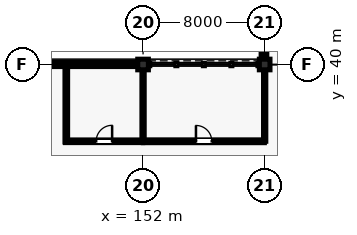
"""IFC4 building model, lengths in metres.
Left out: names, types, materials, properties, quantities, classifications, styles, units other than length and angle.
Written with IfcOpenShell. Run it as: python <this file> out.ifc"""

import sys

from ifc_helpers import new_model, si_unit, direction, frame, frame_2d, origin, origin_2d, place, context, subcontext, project, spatial, rectangle, extrude, element, fill, save


model = new_model("IFC4")
c1 = context("Model", 3, precision=1e-05, world=origin(), true_north=direction((0.0, 1.0)))
c2 = subcontext(c1, "Body", "Model", "MODEL_VIEW")
j1 = project(units=[si_unit("LENGTHUNIT", "METRE"), si_unit("PLANEANGLEUNIT", "RADIAN")], contexts=[c1])
p1 = place(None, origin())
s1 = spatial("IfcSite", under=j1, at=p1, CompositionType="ELEMENT")
p2 = place(p1, origin())
s2 = spatial("IfcBuilding", under=s1, at=p2, CompositionType="ELEMENT")
p3 = place(p2, origin())
s3 = spatial("IfcBuildingStorey", under=s2, at=p3, CompositionType="ELEMENT", Elevation=0.0)
for number, where, z_axis, x_axis in (
    (1, (152.0, 40.0, 0.0), (0.0, 0.0, 1.0), (1.0, 0.0, 0.0)),
    (2, (160.0, 40.0, 0.0), (0.0, 0.0, 1.0), (1.0, 0.0, 0.0)),
):
    element("IfcColumn", number, at=place(p3, frame(where, z_axis=z_axis, x_axis=x_axis)), inside=s3, PredefinedType="COLUMN", context=c2, shape_type="SweptSolid", body=[
        extrude(rectangle(XDim=0.7, YDim=0.7, at=origin_2d()), origin(), (0.0, 0.0, 1.0), 5.28),
    ])
p4 = place(p3, frame((144.335, 40.0, 0.0), z_axis=(0.0, 0.0, 1.0), x_axis=(1.0, 0.0, 0.0)))
e3 = element("IfcWall", 3, at=p4, inside=s3, PredefinedType="SOLIDWALL", context=c2, shape_type="SweptSolid", body=[
    extrude(rectangle(XDim=7.33, YDim=0.27, at=frame_2d((3.665, 0.0))), origin(), (0.0, 0.0, 1.0), 4.677),
])
p5 = place(p4, frame((0.744, 0.0, 0.95)))
e4 = element("IfcOpeningElement", 4, at=p5, cuts=e3, PredefinedType="OPENING", context=c2, shape_type="SweptSolid", body=[
    extrude(rectangle(XDim=1.15, YDim=1.65, at=frame_2d((0.575, 0.825))), frame((0.0, 0.145, 0.0), z_axis=(0.0, -1.0, 0.0), x_axis=(1.0, 0.0, 0.0)), (0.0, 0.0, 1.0), 0.29),
])
p6 = place(p4, frame((5.436, 0.0, 0.95)))
e5 = element("IfcOpeningElement", 5, at=p6, cuts=e3, PredefinedType="OPENING", context=c2, shape_type="SweptSolid", body=[
    extrude(rectangle(XDim=1.15, YDim=1.65, at=frame_2d((0.575, 0.825))), frame((0.0, 0.145, 0.0), z_axis=(0.0, -1.0, 0.0), x_axis=(1.0, 0.0, 0.0)), (0.0, 0.0, 1.0), 0.29),
])
p7 = place(p3, frame((160.0, 40.335, 0.0), z_axis=(0.0, 0.0, 1.0), x_axis=(0.0, 1.0, 0.0)))
e6 = element("IfcWall", 6, at=p7, inside=s3, PredefinedType="SOLIDWALL", context=c2, shape_type="SweptSolid", body=[
    extrude(rectangle(XDim=7.33, YDim=0.28, at=frame_2d((3.665, 0.0))), origin(), (0.0, 0.0, 1.0), 4.674),
])
p8 = place(p7, frame((0.679, 0.0, 0.95)))
e7 = element("IfcOpeningElement", 7, at=p8, cuts=e6, PredefinedType="OPENING", context=c2, shape_type="SweptSolid", body=[
    extrude(rectangle(XDim=1.28, YDim=1.72, at=frame_2d((0.64, 0.86))), frame((0.0, 0.15, 0.0), z_axis=(0.0, -1.0, 0.0), x_axis=(1.0, 0.0, 0.0)), (0.0, 0.0, 1.0), 0.3),
])
p9 = place(p7, frame((5.371, 0.0, 0.95)))
e8 = element("IfcOpeningElement", 8, at=p9, cuts=e6, PredefinedType="OPENING", context=c2, shape_type="SweptSolid", body=[
    extrude(rectangle(XDim=1.28, YDim=1.72, at=frame_2d((0.64, 0.86))), frame((0.0, 0.15, 0.0), z_axis=(0.0, -1.0, 0.0), x_axis=(1.0, 0.0, 0.0)), (0.0, 0.0, 1.0), 0.3),
])
p10 = place(p3, frame((146.9, 34.95, 0.0), z_axis=(0.0, 0.0, 1.0), x_axis=(1.0, 0.0, 0.0)))
e9 = element("IfcWall", 9, at=p10, inside=s3, PredefinedType="PARTITIONING", context=c2, shape_type="SweptSolid", body=[
    extrude(rectangle(XDim=5.08, YDim=0.175, at=frame_2d((2.54, 0.0))), origin(), (0.0, 0.0, 1.0), 4.471),
])
p11 = place(p10, frame((2.015, 0.0, 0.0)))
e10 = element("IfcOpeningElement", 10, at=p11, cuts=e9, PredefinedType="OPENING", context=c2, shape_type="SweptSolid", body=[
    extrude(rectangle(XDim=1.05, YDim=2.15, at=frame_2d((0.525, 1.075))), frame((0.0, 0.097, 0.0), z_axis=(0.0, -1.0, 0.0), x_axis=(1.0, 0.0, 0.0)), (0.0, 0.0, 1.0), 0.195),
])
p12 = place(p3, frame((146.95, 34.9, 0.0), z_axis=(0.0, 0.0, 1.0), x_axis=(0.0, 1.0, 0.0)))
e11 = element("IfcWall", 11, at=p12, inside=s3, PredefinedType="PARTITIONING", context=c2, shape_type="SweptSolid", body=[
    extrude(rectangle(XDim=5.08, YDim=0.175, at=frame_2d((2.54, 0.0))), origin(), (0.0, 0.0, 1.0), 4.613),
])
p13 = place(p3, frame((152.0, 34.95, 0.0), z_axis=(0.0, 0.0, 1.0), x_axis=(0.0, 1.0, 0.0)))
e12 = element("IfcWall", 12, at=p13, inside=s3, PredefinedType="PARTITIONING", context=c2, shape_type="SweptSolid", body=[
    extrude(rectangle(XDim=4.69, YDim=0.15, at=frame_2d((2.345, 0.0))), origin(), (0.0, 0.0, 1.0), 4.471),
])
p14 = place(p3, frame((152.02, 34.95, 0.0), z_axis=(0.0, 0.0, 1.0), x_axis=(1.0, 0.0, 0.0)))
e13 = element("IfcWall", 13, at=p14, inside=s3, PredefinedType="PARTITIONING", context=c2, shape_type="SweptSolid", body=[
    extrude(rectangle(XDim=7.96, YDim=0.185, at=frame_2d((3.98, 0.0))), origin(), (0.0, 0.0, 1.0), 4.403),
])
p15 = place(p14, frame((3.46, 0.0, 0.0)))
e14 = element("IfcOpeningElement", 14, at=p15, cuts=e13, PredefinedType="OPENING", context=c2, shape_type="SweptSolid", body=[
    extrude(rectangle(XDim=1.04, YDim=2.18, at=frame_2d((0.52, 1.09))), frame((0.0, 0.103, 0.0), z_axis=(0.0, -1.0, 0.0), x_axis=(1.0, 0.0, 0.0)), (0.0, 0.0, 1.0), 0.205),
])
p16 = place(p3, frame((160.0, 34.95, 0.0), z_axis=(0.0, 0.0, 1.0), x_axis=(0.0, 1.0, 0.0)))
e15 = element("IfcWall", 15, at=p16, inside=s3, PredefinedType="PARTITIONING", context=c2, shape_type="SweptSolid", body=[
    extrude(rectangle(XDim=4.69, YDim=0.15, at=frame_2d((2.345, 0.0))), origin(), (0.0, 0.0, 1.0), 4.403),
])
p17 = place(p5, origin())
e16 = element("IfcWindow", 16, at=p17, inside=s3, PartitioningType="SINGLE_PANEL", PredefinedType="WINDOW", context=c2, shape_type="SweptSolid", body=[
    extrude(rectangle(XDim=1.15, YDim=1.65, at=frame_2d((0.575, 0.825))), frame((0.0, 0.03, 0.0), z_axis=(0.0, -1.0, 0.0), x_axis=(1.0, 0.0, 0.0)), (0.0, 0.0, 1.0), 0.06),
])
fill(e4, e16)
p18 = place(p6, origin())
e17 = element("IfcWindow", 17, at=p18, inside=s3, PartitioningType="SINGLE_PANEL", PredefinedType="WINDOW", context=c2, shape_type="SweptSolid", body=[
    extrude(rectangle(XDim=1.15, YDim=1.65, at=frame_2d((0.575, 0.825))), frame((0.0, 0.03, 0.0), z_axis=(0.0, -1.0, 0.0), x_axis=(1.0, 0.0, 0.0)), (0.0, 0.0, 1.0), 0.06),
])
fill(e5, e17)
p19 = place(p11, origin())
e18 = element("IfcDoor", 18, at=p19, inside=s3, OperationType="SINGLE_SWING_RIGHT", PredefinedType="DOOR", context=c2, shape_type="SweptSolid", body=[
    extrude(rectangle(XDim=1.05, YDim=2.15, at=frame_2d((0.525, 1.075))), frame((0.0, 0.025, 0.0), z_axis=(0.0, -1.0, 0.0), x_axis=(1.0, 0.0, 0.0)), (0.0, 0.0, 1.0), 0.05),
])
fill(e10, e18)
p20 = place(p15, origin())
e19 = element("IfcDoor", 19, at=p20, inside=s3, OperationType="SINGLE_SWING_LEFT", PredefinedType="DOOR", context=c2, shape_type="SweptSolid", body=[
    extrude(rectangle(XDim=1.04, YDim=2.18, at=frame_2d((0.52, 1.09))), frame((0.0, 0.025, 0.0), z_axis=(0.0, -1.0, 0.0), x_axis=(1.0, 0.0, 0.0)), (0.0, 0.0, 1.0), 0.05),
])
fill(e14, e19)
save(model, sys.argv[1])
